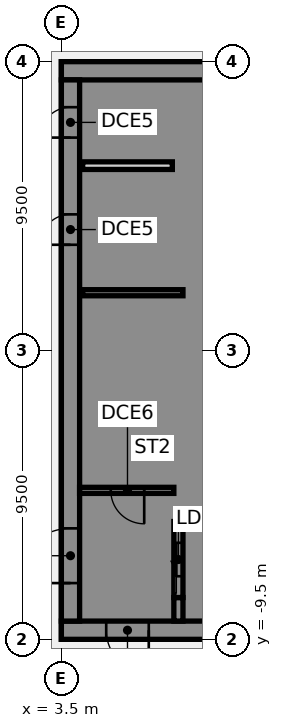
"""IFC4 building model, lengths in metres.
Left out: names, types, materials, properties, quantities, classifications, styles, units other than length and angle.
Written with IfcOpenShell. Run it as: python <this file> out.ifc"""

import sys

from ifc_helpers import new_model, si_unit, direction, frame, frame_2d, origin, place, context, subcontext, project, spatial, polyline, rectangle, outline, extrude, element, fill, save


model = new_model("IFC4")
c1 = context("Model", 3, precision=1e-05, world=origin(), true_north=direction((0.0, 1.0)))
c2 = subcontext(c1, "Body", "Model", "MODEL_VIEW")
j1 = project(units=[si_unit("LENGTHUNIT", "METRE"), si_unit("PLANEANGLEUNIT", "RADIAN")], contexts=[c1])
p1 = place(None, origin())
s1 = spatial("IfcSite", under=j1, at=p1, CompositionType="ELEMENT")
p2 = place(p1, origin())
s2 = spatial("IfcBuilding", under=s1, at=p2, CompositionType="ELEMENT")
p3 = place(p2, frame((0.0, 0.0, 124.75)))
s3 = spatial("IfcBuildingStorey", under=s2, at=p3, CompositionType="ELEMENT", Elevation=124.75)
p4 = place(p3, frame((16.5, -9.2, 0.0), z_axis=(0.0, 0.0, 1.0), x_axis=(-1.0, 0.0, 0.0)))
e1 = element("IfcWall", 1, at=p4, inside=s3, PredefinedType="SHEAR", context=c2, shape_type="SweptSolid", body=[
    extrude(rectangle(XDim=13.0, YDim=0.6, at=frame_2d((6.5, 0.0))), origin(), (0.0, 0.0, 1.0), 3.57),
])
p5 = place(p4, frame((4.15, 0.0, 0.0)))
e2 = element("IfcOpeningElement", 2, at=p5, cuts=e1, PredefinedType="OPENING", context=c2, shape_type="SweptSolid", body=[
    extrude(rectangle(XDim=1.4, YDim=2.1, at=frame_2d((0.7, 1.05))), frame((0.0, 0.31, 0.0), z_axis=(0.0, -1.0, 0.0), x_axis=(1.0, 0.0, 0.0)), (0.0, 0.0, 1.0), 0.62),
])
p6 = place(p4, frame((10.125, 0.0, 0.0)))
e3 = element("IfcOpeningElement", 3, at=p6, cuts=e1, PredefinedType="OPENING", context=c2, shape_type="SweptSolid", body=[
    extrude(rectangle(XDim=1.4, YDim=2.1, at=frame_2d((0.7, 1.05))), frame((0.0, 0.31, 0.0), z_axis=(0.0, -1.0, 0.0), x_axis=(1.0, 0.0, 0.0)), (0.0, 0.0, 1.0), 0.62),
])
p7 = place(p3, frame((16.5, 9.2, 0.0), z_axis=(0.0, 0.0, 1.0), x_axis=(-1.0, 0.0, 0.0)))
e4 = element("IfcWall", 4, at=p7, inside=s3, PredefinedType="SHEAR", context=c2, shape_type="SweptSolid", body=[
    extrude(rectangle(XDim=13.0, YDim=0.6, at=frame_2d((6.5, 0.0))), origin(), (0.0, 0.0, 1.0), 3.57),
])
p8 = place(p3, origin())
e5 = element("IfcWall", 5, at=p8, inside=s3, PredefinedType="SHEAR", context=c2, shape_type="SweptSolid", body=[
    extrude(outline(polyline([(9.8, -5.375), (7.5, -5.375), (7.5, -2.875), (9.8, -2.875), (9.8, -2.625), (7.5, -2.625), (7.5, -0.125), (9.8, -0.125), (9.8, 0.125), (7.5, 0.125), (7.5, 2.625), (9.8, 2.625), (9.8, 2.875), (7.5, 2.875), (7.5, 5.375), (9.8, 5.375), (9.8, 5.625), (7.5, 5.625), (7.5, 8.125), (9.8, 8.125), (9.8, 8.9), (7.5, 8.9), (7.2, 8.9), (7.2, -5.625), (7.5, -5.625), (9.8, -5.625), (9.8, -5.375)])), origin(), (0.0, 0.0, 1.0), 3.57),
])
p9 = place(p3, origin())
e6 = element("IfcWall", 6, at=p9, inside=s3, PredefinedType="SHEAR", context=c2, shape_type="SweptSolid", body=[
    extrude(outline(polyline([(7.5, -8.125), (7.5, -8.9), (9.8, -8.9), (9.8, -8.125), (9.8, -5.625), (9.55, -5.625), (9.55, -8.125), (7.5, -8.125)])), origin(), (0.0, 0.0, 1.0), 3.57),
])
p10 = place(p3, frame((7.35, -8.9, 0.0), z_axis=(0.0, 0.0, 1.0), x_axis=(0.0, 1.0, 0.0)))
e7 = element("IfcWall", 7, at=p10, inside=s3, PredefinedType="SHEAR", context=c2, shape_type="SweptSolid", body=[
    extrude(rectangle(XDim=0.775, YDim=0.3, at=frame_2d((0.387, 0.0))), origin(), (0.0, 0.0, 1.0), 3.57),
])
p11 = place(p3, frame((7.5, 1.9, 0.0), z_axis=(0.0, 0.0, 1.0), x_axis=(-1.0, 0.0, 0.0)))
e8 = element("IfcWall", 8, at=p11, inside=s3, PredefinedType="SHEAR", context=c2, shape_type="SweptSolid", body=[
    extrude(rectangle(XDim=3.3, YDim=0.2, at=frame_2d((1.65, 0.0))), origin(), (0.0, 0.0, 1.0), 3.57),
])
p12 = place(p3, frame((7.35, -8.125, 0.0), z_axis=(0.0, 0.0, 1.0), x_axis=(0.0, 1.0, 0.0)))
e9 = element("IfcWall", 9, at=p12, inside=s3, PredefinedType="SHEAR", context=c2, shape_type="SweptSolid", body=[
    extrude(rectangle(XDim=2.5, YDim=0.3, at=frame_2d((1.25, 0.0))), origin(), (0.0, 0.0, 1.0), 3.57),
])
p13 = place(p12, frame((0.7, 0.0, 0.0)))
e10 = element("IfcOpeningElement", 10, at=p13, cuts=e9, PredefinedType="OPENING", context=c2, shape_type="SweptSolid", body=[
    extrude(rectangle(XDim=1.1, YDim=2.1, at=frame_2d((0.55, 1.05))), frame((0.0, 0.16, 0.0), z_axis=(0.0, -1.0, 0.0), x_axis=(1.0, 0.0, 0.0)), (0.0, 0.0, 1.0), 0.32),
])
p14 = place(p3, frame((3.8, -8.9, 0.0), z_axis=(0.0, 0.0, 1.0), x_axis=(0.0, 1.0, 0.0)))
e11 = element("IfcWall", 11, at=p14, inside=s3, PredefinedType="SHEAR", context=c2, shape_type="SweptSolid", body=[
    extrude(rectangle(XDim=17.8, YDim=0.6, at=frame_2d((8.9, 0.0))), origin(), (0.0, 0.0, 1.0), 3.57),
])
p15 = place(p14, frame((1.25, 0.0, 0.0)))
e12 = element("IfcOpeningElement", 12, at=p15, cuts=e11, PredefinedType="OPENING", context=c2, shape_type="SweptSolid", body=[
    extrude(rectangle(XDim=1.8, YDim=2.1, at=frame_2d((0.9, 1.05))), frame((0.0, 0.31, 0.0), z_axis=(0.0, -1.0, 0.0), x_axis=(1.0, 0.0, 0.0)), (0.0, 0.0, 1.0), 0.62),
])
p16 = place(p14, frame((12.377, 0.0, 0.0)))
e13 = element("IfcOpeningElement", 13, at=p16, cuts=e11, PredefinedType="OPENING", context=c2, shape_type="SweptSolid", body=[
    extrude(rectangle(XDim=1.0, YDim=2.1, at=frame_2d((0.5, 1.05))), frame((0.0, 0.31, 0.0), z_axis=(0.0, -1.0, 0.0), x_axis=(1.0, 0.0, 0.0)), (0.0, 0.0, 1.0), 0.62),
])
p17 = place(p14, frame((15.903, 0.0, 0.0)))
e14 = element("IfcOpeningElement", 14, at=p17, cuts=e11, PredefinedType="OPENING", context=c2, shape_type="SweptSolid", body=[
    extrude(rectangle(XDim=1.0, YDim=2.1, at=frame_2d((0.5, 1.05))), frame((0.0, 0.31, 0.0), z_axis=(0.0, -1.0, 0.0), x_axis=(1.0, 0.0, 0.0)), (0.0, 0.0, 1.0), 0.62),
])
p18 = place(p3, frame((7.15, 6.08, 0.0), z_axis=(0.0, 0.0, 1.0), x_axis=(-1.0, 0.0, 0.0)))
e15 = element("IfcWall", 15, at=p18, inside=s3, PredefinedType="PARTITIONING", context=c2, shape_type="SweptSolid", body=[
    extrude(rectangle(XDim=2.95, YDim=0.25, at=frame_2d((1.475, 0.0))), origin(), (0.0, 0.0, 1.0), 3.57),
])
p19 = place(p3, frame((7.2, -4.6, 0.0), z_axis=(0.0, 0.0, 1.0), x_axis=(-1.0, 0.0, 0.0)))
e16 = element("IfcWall", 16, at=p19, inside=s3, PredefinedType="SHEAR", context=c2, shape_type="SweptSolid", body=[
    extrude(rectangle(XDim=3.1, YDim=0.2, at=frame_2d((1.55, 0.0))), origin(), (0.0, 0.0, 1.0), 3.57),
])
p20 = place(p19, frame((0.975, 0.0, 0.0)))
e17 = element("IfcOpeningElement", 17, at=p20, cuts=e16, PredefinedType="OPENING", context=c2, shape_type="SweptSolid", body=[
    extrude(rectangle(XDim=1.1, YDim=2.1, at=frame_2d((0.55, 1.05))), frame((0.0, 0.11, 0.0), z_axis=(0.0, -1.0, 0.0), x_axis=(1.0, 0.0, 0.0)), (0.0, 0.0, 1.0), 0.22),
])
p21 = place(p6, origin())
e18 = element("IfcDoor", 18, at=p21, inside=s3, OperationType="SINGLE_SWING_LEFT", PredefinedType="DOOR", context=c2, shape_type="SweptSolid", body=[
    extrude(rectangle(XDim=1.4, YDim=2.1, at=frame_2d((0.7, 1.05))), frame((0.0, 0.025, 0.0), z_axis=(0.0, -1.0, 0.0), x_axis=(1.0, 0.0, 0.0)), (0.0, 0.0, 1.0), 0.05),
])
fill(e3, e18)
p22 = place(p15, origin())
e19 = element("IfcDoor", 19, at=p22, inside=s3, OperationType="SINGLE_SWING_LEFT", PredefinedType="DOOR", context=c2, shape_type="SweptSolid", body=[
    extrude(rectangle(XDim=1.8, YDim=2.1, at=frame_2d((0.9, 1.05))), frame((0.0, 0.025, 0.0), z_axis=(0.0, -1.0, 0.0), x_axis=(1.0, 0.0, 0.0)), (0.0, 0.0, 1.0), 0.05),
])
fill(e12, e19)
p23 = place(p16, origin())
e20 = element("IfcDoor", 20, at=p23, inside=s3, OperationType="SINGLE_SWING_LEFT", PredefinedType="DOOR", context=c2, shape_type="SweptSolid", body=[
    extrude(rectangle(XDim=1.0, YDim=2.1, at=frame_2d((0.5, 1.05))), frame((0.0, -0.225, 0.0), z_axis=(0.0, -1.0, 0.0), x_axis=(1.0, 0.0, 0.0)), (0.0, 0.0, 1.0), 0.05),
])
fill(e13, e20)
p24 = place(p17, origin())
e21 = element("IfcDoor", 21, at=p24, inside=s3, OperationType="SINGLE_SWING_LEFT", PredefinedType="DOOR", context=c2, shape_type="SweptSolid", body=[
    extrude(rectangle(XDim=1.0, YDim=2.1, at=frame_2d((0.5, 1.05))), frame((0.0, -0.225, 0.0), z_axis=(0.0, -1.0, 0.0), x_axis=(1.0, 0.0, 0.0)), (0.0, 0.0, 1.0), 0.05),
])
fill(e14, e21)
p25 = place(p20, origin())
e22 = element("IfcDoor", 22, at=p25, inside=s3, OperationType="SINGLE_SWING_LEFT", PredefinedType="DOOR", context=c2, shape_type="SweptSolid", body=[
    extrude(rectangle(XDim=1.1, YDim=2.1, at=frame_2d((0.55, 1.05))), frame((0.0, 0.025, 0.0), z_axis=(0.0, -1.0, 0.0), x_axis=(1.0, 0.0, 0.0)), (0.0, 0.0, 1.0), 0.05),
])
fill(e17, e22)
p26 = place(p13, origin())
e23 = element("IfcDoor", 23, at=p26, inside=s3, OperationType="SLIDING_TO_LEFT", PredefinedType="DOOR", context=c2, shape_type="SweptSolid", body=[
    extrude(rectangle(XDim=1.1, YDim=2.1, at=frame_2d((0.55, 1.05))), frame((0.0, 0.025, 0.0), z_axis=(0.0, -1.0, 0.0), x_axis=(1.0, 0.0, 0.0)), (0.0, 0.0, 1.0), 0.05),
])
fill(e10, e23)
save(model, sys.argv[1])
